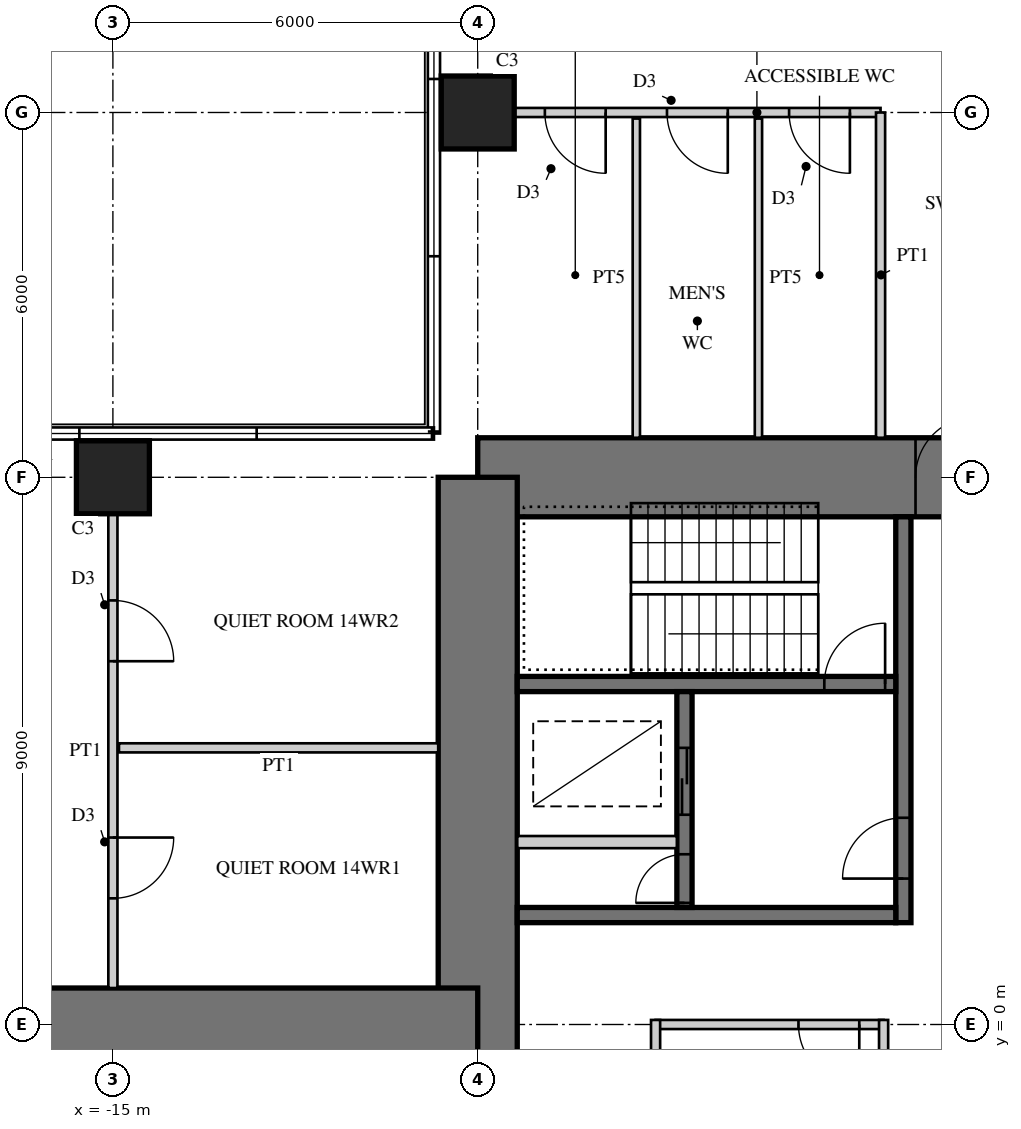
"""IFC4 building model, lengths in metres.
Left out: names, types, materials, properties, quantities, classifications, styles, units other than length and angle.
Written with IfcOpenShell. Run it as: python <this file> out.ifc"""

import sys

from ifc_helpers import new_model, si_unit, direction, frame, frame_2d, origin, origin_2d, place, context, subcontext, project, spatial, rectangle, extrude, element, fill, save


model = new_model("IFC4")
c1 = context("Model", 3, precision=1e-05, world=origin(), true_north=direction((0.0, 1.0)))
c2 = subcontext(c1, "Body", "Model", "MODEL_VIEW")
j1 = project(units=[si_unit("LENGTHUNIT", "METRE"), si_unit("PLANEANGLEUNIT", "RADIAN")], contexts=[c1])
p1 = place(None, origin())
s1 = spatial("IfcSite", under=j1, at=p1, CompositionType="ELEMENT")
p2 = place(p1, origin())
s2 = spatial("IfcBuilding", under=s1, at=p2, CompositionType="ELEMENT")
p3 = place(p2, frame((0.0, 0.0, 59.5)))
s3 = spatial("IfcBuildingStorey", under=s2, at=p3, CompositionType="ELEMENT", Elevation=59.5)
p4 = place(p3, frame((9.0, 9.0, 0.0), z_axis=(0.0, 0.0, 1.0), x_axis=(-1.0, 0.0, 0.0)))
e1 = element("IfcWall", 1, at=p4, inside=s3, PredefinedType="SHEAR", context=c2, shape_type="SweptSolid", body=[
    extrude(rectangle(XDim=18.0, YDim=1.3, at=frame_2d((9.0, 0.0))), origin(), (0.0, 0.0, 1.0), 4.0),
])
p5 = place(p4, frame((9.8, 0.0, 0.0)))
e2 = element("IfcOpeningElement", 2, at=p5, cuts=e1, PredefinedType="OPENING", context=c2, shape_type="SweptSolid", body=[
    extrude(rectangle(XDim=1.0, YDim=2.4, at=frame_2d((0.5, 1.2))), frame((0.0, 0.66, 0.0), z_axis=(0.0, -1.0, 0.0), x_axis=(1.0, 0.0, 0.0)), (0.0, 0.0, 1.0), 1.32),
])
p6 = place(p3, frame((-9.0, 9.0, 0.0), z_axis=(0.0, 0.0, 1.0), x_axis=(0.0, -1.0, 0.0)))
e3 = element("IfcWall", 3, at=p6, inside=s3, PredefinedType="SHEAR", context=c2, shape_type="SweptSolid", body=[
    extrude(rectangle(XDim=18.0, YDim=1.3, at=frame_2d((9.0, 0.0))), origin(), (0.0, 0.0, 1.0), 4.0),
])
p7 = place(p6, frame((9.8, 0.0, 0.0)))
e4 = element("IfcOpeningElement", 4, at=p7, cuts=e3, PredefinedType="OPENING", context=c2, shape_type="SweptSolid", body=[
    extrude(rectangle(XDim=1.0, YDim=2.4, at=frame_2d((0.5, 1.2))), frame((0.0, 0.66, 0.0), z_axis=(0.0, -1.0, 0.0), x_axis=(1.0, 0.0, 0.0)), (0.0, 0.0, 1.0), 1.32),
])
p8 = place(p3, frame((-2.0, 1.675, 0.0), z_axis=(0.0, 0.0, 1.0), x_axis=(0.0, 1.0, 0.0)))
e5 = element("IfcWall", 5, at=p8, inside=s3, PredefinedType="SHEAR", context=c2, shape_type="SweptSolid", body=[
    extrude(rectangle(XDim=6.675, YDim=0.25, at=frame_2d((3.337, 0.0))), origin(), (0.0, 0.0, 1.0), 4.0),
])
p9 = place(p8, frame((0.725, 0.0, 0.0)))
e6 = element("IfcOpeningElement", 6, at=p9, cuts=e5, PredefinedType="OPENING", context=c2, shape_type="SweptSolid", body=[
    extrude(rectangle(XDim=1.0, YDim=2.1, at=frame_2d((0.5, 1.05))), frame((0.0, 0.135, 0.0), z_axis=(0.0, -1.0, 0.0), x_axis=(1.0, 0.0, 0.0)), (0.0, 0.0, 1.0), 0.27),
])
p10 = place(p3, frame((-2.125, 1.8, 0.0), z_axis=(0.0, 0.0, 1.0), x_axis=(-1.0, 0.0, 0.0)))
e7 = element("IfcWall", 7, at=p10, inside=s3, PredefinedType="SHEAR", context=c2, shape_type="SweptSolid", body=[
    extrude(rectangle(XDim=6.225, YDim=0.25, at=frame_2d((3.113, 0.0))), origin(), (0.0, 0.0, 1.0), 4.0),
])
p11 = place(p3, frame((-2.125, 5.6, 0.0), z_axis=(0.0, 0.0, 1.0), x_axis=(-1.0, 0.0, 0.0)))
e8 = element("IfcWall", 8, at=p11, inside=s3, PredefinedType="SHEAR", context=c2, shape_type="SweptSolid", body=[
    extrude(rectangle(XDim=6.225, YDim=0.25, at=frame_2d((3.113, 0.0))), origin(), (0.0, 0.0, 1.0), 4.0),
])
p12 = place(p11, frame((0.175, 0.0, 0.0)))
e9 = element("IfcOpeningElement", 9, at=p12, cuts=e8, PredefinedType="OPENING", context=c2, shape_type="SweptSolid", body=[
    extrude(rectangle(XDim=1.0, YDim=2.1, at=frame_2d((0.5, 1.05))), frame((0.0, 0.135, 0.0), z_axis=(0.0, -1.0, 0.0), x_axis=(1.0, 0.0, 0.0)), (0.0, 0.0, 1.0), 0.27),
])
p13 = place(p3, frame((-5.6, 1.925, 0.0), z_axis=(0.0, 0.0, 1.0), x_axis=(0.0, 1.0, 0.0)))
e10 = element("IfcWall", 10, at=p13, inside=s3, PredefinedType="SHEAR", context=c2, shape_type="SweptSolid", body=[
    extrude(rectangle(XDim=3.55, YDim=0.25, at=frame_2d((1.775, 0.0))), origin(), (0.0, 0.0, 1.0), 4.0),
])
p14 = place(p13, frame((1.525, 0.0, 0.0)))
e11 = element("IfcOpeningElement", 11, at=p14, cuts=e10, PredefinedType="OPENING", context=c2, shape_type="SweptSolid", body=[
    extrude(rectangle(XDim=1.1, YDim=2.2, at=frame_2d((0.55, 1.1))), frame((0.0, 0.135, 0.0), z_axis=(0.0, -1.0, 0.0), x_axis=(1.0, 0.0, 0.0)), (0.0, 0.0, 1.0), 0.27),
])
p15 = place(p13, frame((0.075, 0.0, 0.0)))
e12 = element("IfcOpeningElement", 12, at=p15, cuts=e10, PredefinedType="OPENING", context=c2, shape_type="SweptSolid", body=[
    extrude(rectangle(XDim=0.8, YDim=2.1, at=frame_2d((0.4, 1.05))), frame((0.0, 0.135, 0.0), z_axis=(0.0, -1.0, 0.0), x_axis=(1.0, 0.0, 0.0)), (0.0, 0.0, 1.0), 0.27),
])
p16 = place(p3, frame((-5.725, 3.0, 0.0), z_axis=(0.0, 0.0, 1.0), x_axis=(-1.0, 0.0, 0.0)))
e13 = element("IfcWall", 13, at=p16, inside=s3, PredefinedType="PARTITIONING", context=c2, shape_type="SweptSolid", body=[
    extrude(rectangle(XDim=2.625, YDim=0.2, at=frame_2d((1.312, 0.0))), origin(), (0.0, 0.0, 1.0), 4.0),
])
p17 = place(p3, frame((-9.0, 0.0, 0.0), z_axis=(0.0, 0.0, 1.0), x_axis=(-1.0, 0.0, 0.0)))
e14 = element("IfcWall", 14, at=p17, inside=s3, PredefinedType="SHEAR", context=c2, shape_type="SweptSolid", body=[
    extrude(rectangle(XDim=18.0, YDim=1.2, at=frame_2d((9.0, 0.0))), origin(), (0.0, 0.0, 1.0), 4.0),
])
p18 = place(p17, frame((9.9, 0.0, 0.0)))
e15 = element("IfcOpeningElement", 15, at=p18, cuts=e14, PredefinedType="OPENING", context=c2, shape_type="SweptSolid", body=[
    extrude(rectangle(XDim=1.0, YDim=2.2, at=frame_2d((0.5, 1.1))), frame((0.0, 0.61, 0.0), z_axis=(0.0, -1.0, 0.0), x_axis=(1.0, 0.0, 0.0)), (0.0, 0.0, 1.0), 1.22),
])
for number, where, z_axis, x_axis in (
    (16, (-9.0, 15.0, 0.0), (0.0, 0.0, 1.0), (1.0, 0.0, 0.0)),
    (17, (-15.0, 9.0, 0.0), (0.0, 0.0, 1.0), (1.0, 0.0, 0.0)),
):
    element("IfcColumn", number, at=place(p3, frame(where, z_axis=z_axis, x_axis=x_axis)), inside=s3, PredefinedType="COLUMN", context=c2, shape_type="SweptSolid", body=[
        extrude(rectangle(XDim=1.2, YDim=1.2, at=origin_2d()), origin(), (0.0, 0.0, 1.0), 4.0),
    ])
p19 = place(p3, frame((-2.325, 0.0, 0.0), z_axis=(0.0, 0.0, 1.0), x_axis=(-1.0, 0.0, 0.0)))
e18 = element("IfcWall", 18, at=p19, inside=s3, PredefinedType="PARTITIONING", context=c2, shape_type="SweptSolid", body=[
    extrude(rectangle(XDim=3.75, YDim=0.15, at=frame_2d((1.875, 0.0))), origin(), (0.0, 0.0, 1.0), 3.8),
])
p20 = place(p19, frame((0.4, 0.0, 0.0)))
e19 = element("IfcOpeningElement", 19, at=p20, cuts=e18, PredefinedType="OPENING", context=c2, shape_type="SweptSolid", body=[
    extrude(rectangle(XDim=1.0, YDim=2.1, at=frame_2d((0.5, 1.05))), frame((0.0, 0.085, 0.0), z_axis=(0.0, -1.0, 0.0), x_axis=(1.0, 0.0, 0.0)), (0.0, 0.0, 1.0), 0.17),
])
for number, where, z_axis, x_axis in (
    (20, (-2.325, -1.875, 0.0), (0.0, 0.0, 1.0), (0.0, 1.0, 0.0)),
    (21, (-6.075, 0.075, 0.0), (0.0, 0.0, 1.0), (0.0, -1.0, 0.0)),
):
    element("IfcWall", number, at=place(p3, frame(where, z_axis=z_axis, x_axis=x_axis)), inside=s3, PredefinedType="PARTITIONING", context=c2, shape_type="SweptSolid", body=[
        extrude(rectangle(XDim=1.95, YDim=0.15, at=frame_2d((0.975, 0.0))), origin(), (0.0, 0.0, 1.0), 3.8),
    ])
p21 = place(p3, frame((-2.375, 15.0, 0.0), z_axis=(0.0, 0.0, 1.0), x_axis=(-1.0, 0.0, 0.0)))
e22 = element("IfcWall", 22, at=p21, inside=s3, PredefinedType="PARTITIONING", context=c2, shape_type="SweptSolid", body=[
    extrude(rectangle(XDim=6.025, YDim=0.15, at=frame_2d((3.012, 0.0))), origin(), (0.0, 0.0, 1.0), 2.95),
])
p22 = place(p21, frame((0.504, 0.0, 0.0)))
e23 = element("IfcOpeningElement", 23, at=p22, cuts=e22, PredefinedType="OPENING", context=c2, shape_type="SweptSolid", body=[
    extrude(rectangle(XDim=1.0, YDim=2.1, at=frame_2d((0.5, 1.05))), frame((0.0, 0.085, 0.0), z_axis=(0.0, -1.0, 0.0), x_axis=(1.0, 0.0, 0.0)), (0.0, 0.0, 1.0), 0.17),
])
p23 = place(p21, frame((2.512, 0.0, 0.0)))
e24 = element("IfcOpeningElement", 24, at=p23, cuts=e22, PredefinedType="OPENING", context=c2, shape_type="SweptSolid", body=[
    extrude(rectangle(XDim=1.0, YDim=2.1, at=frame_2d((0.5, 1.05))), frame((0.0, 0.085, 0.0), z_axis=(0.0, -1.0, 0.0), x_axis=(1.0, 0.0, 0.0)), (0.0, 0.0, 1.0), 0.17),
])
p24 = place(p21, frame((4.521, 0.0, 0.0)))
e25 = element("IfcOpeningElement", 25, at=p24, cuts=e22, PredefinedType="OPENING", context=c2, shape_type="SweptSolid", body=[
    extrude(rectangle(XDim=1.0, YDim=2.1, at=frame_2d((0.5, 1.05))), frame((0.0, 0.085, 0.0), z_axis=(0.0, -1.0, 0.0), x_axis=(1.0, 0.0, 0.0)), (0.0, 0.0, 1.0), 0.17),
])
p25 = place(p3, frame((-2.375, 9.65, 0.0), z_axis=(0.0, 0.0, 1.0), x_axis=(0.0, 1.0, 0.0)))
e26 = element("IfcWall", 26, at=p25, inside=s3, PredefinedType="PARTITIONING", context=c2, shape_type="SweptSolid", body=[
    extrude(rectangle(XDim=5.35, YDim=0.15, at=frame_2d((2.675, 0.0))), origin(), (0.0, 0.0, 1.0), 3.8),
])
for number, where, z_axis, x_axis in (
    (27, (-4.383, 9.65, 0.0), (0.0, 0.0, 1.0), (0.0, 1.0, 0.0)),
    (28, (-6.392, 9.65, 0.0), (0.0, 0.0, 1.0), (0.0, 1.0, 0.0)),
):
    element("IfcWall", number, at=place(p3, frame(where, z_axis=z_axis, x_axis=x_axis)), inside=s3, PredefinedType="PLUMBINGWALL", context=c2, shape_type="SweptSolid", body=[
        extrude(rectangle(XDim=5.25, YDim=0.12, at=frame_2d((2.625, 0.0))), origin(), (0.0, 0.0, 1.0), 3.8),
    ])
p26 = place(p3, frame((-15.0, 8.4, 0.0), z_axis=(0.0, 0.0, 1.0), x_axis=(0.0, -1.0, 0.0)))
e29 = element("IfcWall", 29, at=p26, inside=s3, PredefinedType="PARTITIONING", context=c2, shape_type="SweptSolid", body=[
    extrude(rectangle(XDim=7.8, YDim=0.15, at=frame_2d((3.9, 0.0))), origin(), (0.0, 0.0, 1.0), 2.95),
])
p27 = place(p26, frame((1.425, 0.0, 0.0)))
e30 = element("IfcOpeningElement", 30, at=p27, cuts=e29, PredefinedType="OPENING", context=c2, shape_type="SweptSolid", body=[
    extrude(rectangle(XDim=1.0, YDim=2.1, at=frame_2d((0.5, 1.05))), frame((0.0, 0.085, 0.0), z_axis=(0.0, -1.0, 0.0), x_axis=(1.0, 0.0, 0.0)), (0.0, 0.0, 1.0), 0.17),
])
p28 = place(p26, frame((5.325, 0.0, 0.0)))
e31 = element("IfcOpeningElement", 31, at=p28, cuts=e29, PredefinedType="OPENING", context=c2, shape_type="SweptSolid", body=[
    extrude(rectangle(XDim=1.0, YDim=2.1, at=frame_2d((0.5, 1.05))), frame((0.0, 0.085, 0.0), z_axis=(0.0, -1.0, 0.0), x_axis=(1.0, 0.0, 0.0)), (0.0, 0.0, 1.0), 0.17),
])
p29 = place(p3, frame((-9.65, 4.55, 0.0), z_axis=(0.0, 0.0, 1.0), x_axis=(-1.0, 0.0, 0.0)))
e32 = element("IfcWall", 32, at=p29, inside=s3, PredefinedType="PARTITIONING", context=c2, shape_type="SweptSolid", body=[
    extrude(rectangle(XDim=5.25, YDim=0.15, at=frame_2d((2.625, 0.0))), origin(), (0.0, 0.0, 1.0), 3.8),
])
p30 = place(p20, origin())
e33 = element("IfcDoor", 33, at=p30, inside=s3, OperationType="SINGLE_SWING_LEFT", PredefinedType="DOOR", context=c2, shape_type="SweptSolid", body=[
    extrude(rectangle(XDim=1.0, YDim=2.1, at=frame_2d((0.5, 1.05))), frame((0.0, 0.025, 0.0), z_axis=(0.0, -1.0, 0.0), x_axis=(1.0, 0.0, 0.0)), (0.0, 0.0, 1.0), 0.05),
])
fill(e19, e33)
p31 = place(p22, origin())
e34 = element("IfcDoor", 34, at=p31, inside=s3, OperationType="SINGLE_SWING_LEFT", PredefinedType="DOOR", context=c2, shape_type="SweptSolid", body=[
    extrude(rectangle(XDim=1.0, YDim=2.1, at=frame_2d((0.5, 1.05))), frame((0.0, 0.025, 0.0), z_axis=(0.0, -1.0, 0.0), x_axis=(1.0, 0.0, 0.0)), (0.0, 0.0, 1.0), 0.05),
])
fill(e23, e34)
p32 = place(p23, origin())
e35 = element("IfcDoor", 35, at=p32, inside=s3, OperationType="SINGLE_SWING_LEFT", PredefinedType="DOOR", context=c2, shape_type="SweptSolid", body=[
    extrude(rectangle(XDim=1.0, YDim=2.1, at=frame_2d((0.5, 1.05))), frame((0.0, 0.025, 0.0), z_axis=(0.0, -1.0, 0.0), x_axis=(1.0, 0.0, 0.0)), (0.0, 0.0, 1.0), 0.05),
])
fill(e24, e35)
p33 = place(p24, origin())
e36 = element("IfcDoor", 36, at=p33, inside=s3, OperationType="SINGLE_SWING_LEFT", PredefinedType="DOOR", context=c2, shape_type="SweptSolid", body=[
    extrude(rectangle(XDim=1.0, YDim=2.1, at=frame_2d((0.5, 1.05))), frame((0.0, 0.025, 0.0), z_axis=(0.0, -1.0, 0.0), x_axis=(1.0, 0.0, 0.0)), (0.0, 0.0, 1.0), 0.05),
])
fill(e25, e36)
p34 = place(p27, origin())
e37 = element("IfcDoor", 37, at=p34, inside=s3, OperationType="SINGLE_SWING_RIGHT", PredefinedType="DOOR", context=c2, shape_type="SweptSolid", body=[
    extrude(rectangle(XDim=1.0, YDim=2.1, at=frame_2d((0.5, 1.05))), frame((0.0, 0.025, 0.0), z_axis=(0.0, -1.0, 0.0), x_axis=(1.0, 0.0, 0.0)), (0.0, 0.0, 1.0), 0.05),
])
fill(e30, e37)
p35 = place(p28, origin())
e38 = element("IfcDoor", 38, at=p35, inside=s3, OperationType="SINGLE_SWING_LEFT", PredefinedType="DOOR", context=c2, shape_type="SweptSolid", body=[
    extrude(rectangle(XDim=1.0, YDim=2.1, at=frame_2d((0.5, 1.05))), frame((0.0, 0.025, 0.0), z_axis=(0.0, -1.0, 0.0), x_axis=(1.0, 0.0, 0.0)), (0.0, 0.0, 1.0), 0.05),
])
fill(e31, e38)
p36 = place(p5, frame((1.0, 0.0, 0.0), z_axis=(0.0, 0.0, 1.0), x_axis=(-1.0, 0.0, 0.0)))
e39 = element("IfcDoor", 39, at=p36, inside=s3, OperationType="SINGLE_SWING_RIGHT", PredefinedType="DOOR", context=c2, shape_type="SweptSolid", body=[
    extrude(rectangle(XDim=1.0, YDim=2.4, at=frame_2d((0.5, 1.2))), frame((0.0, -0.005, 0.0), z_axis=(0.0, -1.0, 0.0), x_axis=(1.0, 0.0, 0.0)), (0.0, 0.0, 1.0), 0.05),
])
fill(e2, e39)
p37 = place(p9, origin())
e40 = element("IfcDoor", 40, at=p37, inside=s3, OperationType="SINGLE_SWING_LEFT", PredefinedType="DOOR", context=c2, shape_type="SweptSolid", body=[
    extrude(rectangle(XDim=1.0, YDim=2.1, at=frame_2d((0.5, 1.05))), frame((0.0, 0.025, 0.0), z_axis=(0.0, -1.0, 0.0), x_axis=(1.0, 0.0, 0.0)), (0.0, 0.0, 1.0), 0.05),
])
fill(e6, e40)
p38 = place(p12, frame((1.0, 0.0, 0.0), z_axis=(0.0, 0.0, 1.0), x_axis=(-1.0, 0.0, 0.0)))
e41 = element("IfcDoor", 41, at=p38, inside=s3, OperationType="SINGLE_SWING_RIGHT", PredefinedType="DOOR", context=c2, shape_type="SweptSolid", body=[
    extrude(rectangle(XDim=1.0, YDim=2.1, at=frame_2d((0.5, 1.05))), frame((0.0, 0.025, 0.0), z_axis=(0.0, -1.0, 0.0), x_axis=(1.0, 0.0, 0.0)), (0.0, 0.0, 1.0), 0.05),
])
fill(e9, e41)
p39 = place(p14, origin())
e42 = element("IfcDoor", 42, at=p39, inside=s3, OperationType="DOUBLE_DOOR_SLIDING", PredefinedType="DOOR", context=c2, shape_type="SweptSolid", body=[
    extrude(rectangle(XDim=1.1, YDim=2.2, at=frame_2d((0.55, 1.1))), frame((0.0, 0.025, 0.0), z_axis=(0.0, -1.0, 0.0), x_axis=(1.0, 0.0, 0.0)), (0.0, 0.0, 1.0), 0.05),
])
fill(e11, e42)
p40 = place(p15, origin())
e43 = element("IfcDoor", 43, at=p40, inside=s3, OperationType="SINGLE_SWING_LEFT", PredefinedType="DOOR", context=c2, shape_type="SweptSolid", body=[
    extrude(rectangle(XDim=0.8, YDim=2.1, at=frame_2d((0.4, 1.05))), frame((0.0, 0.025, 0.0), z_axis=(0.0, -1.0, 0.0), x_axis=(1.0, 0.0, 0.0)), (0.0, 0.0, 1.0), 0.05),
])
fill(e12, e43)
save(model, sys.argv[1])
